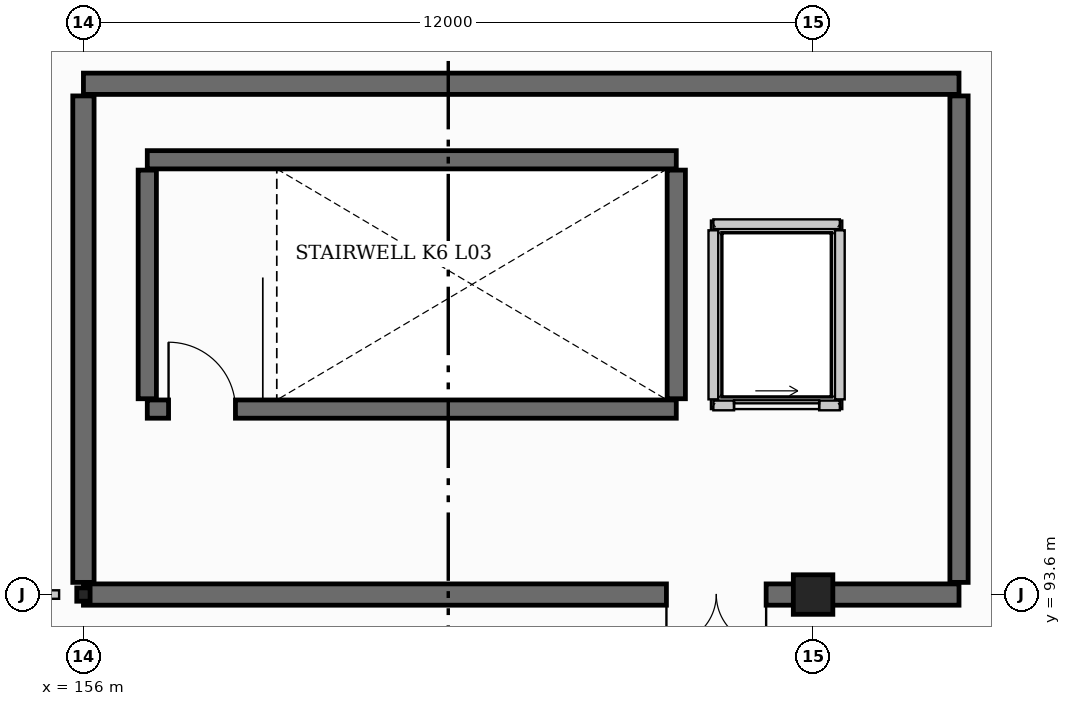
"""IFC4 building model, lengths in metres.
Left out: names, types, materials, properties, quantities, classifications, styles, units other than length and angle.
Written with IfcOpenShell. Run it as: python <this file> out.ifc"""

import sys

from ifc_helpers import new_model, si_unit, direction, frame, frame_2d, origin, origin_2d, place, context, subcontext, project, spatial, rectangle, hollow_circle, extrude, element, fill, save


model = new_model("IFC4")
c1 = context("Model", 3, precision=1e-05, world=origin(), true_north=direction((0.0, 1.0)))
c2 = subcontext(c1, "Body", "Model", "MODEL_VIEW")
j1 = project(units=[si_unit("LENGTHUNIT", "METRE"), si_unit("PLANEANGLEUNIT", "RADIAN")], contexts=[c1])
p1 = place(None, origin())
s1 = spatial("IfcSite", under=j1, at=p1, CompositionType="ELEMENT")
p2 = place(p1, origin())
s2 = spatial("IfcBuilding", under=s1, at=p2, CompositionType="ELEMENT")
p3 = place(p2, frame((0.0, 0.0, 14.4)))
s3 = spatial("IfcBuildingStorey", under=s2, at=p3, CompositionType="ELEMENT", Elevation=14.4)
p4 = place(p3, frame((156.0, 93.6, 0.0), z_axis=(0.0, 0.0, 1.0), x_axis=(0.0, 1.0, 0.0)))
e1 = element("IfcColumn", 1, at=p4, inside=s3, PredefinedType="COLUMN", context=c2, shape_type="SweptSolid", body=[
    extrude(hollow_circle(Radius=0.11, WallThickness=0.01, at=origin_2d()), origin(), (0.0, 0.0, 1.0), 3.9),
])
p5 = place(p3, frame((168.0, 93.6, 0.0), z_axis=(0.0, 0.0, 1.0), x_axis=(1.0, 0.0, 0.0)))
e2 = element("IfcColumn", 2, at=p5, inside=s3, PredefinedType="COLUMN", context=c2, shape_type="SweptSolid", body=[
    extrude(rectangle(XDim=0.65, YDim=0.65, at=origin_2d()), origin(), (0.0, 0.0, 1.0), 3.9),
])
p6 = place(p3, frame((156.0, 102.0, 0.0), z_axis=(0.0, 0.0, 1.0), x_axis=(1.0, 0.0, 0.0)))
e3 = element("IfcWall", 3, at=p6, inside=s3, PredefinedType="SHEAR", context=c2, shape_type="SweptSolid", body=[
    extrude(rectangle(XDim=14.4, YDim=0.35, at=frame_2d((7.2, 0.0))), origin(), (0.0, 0.0, 1.0), 3.9),
])
p7 = place(p3, frame((170.4, 93.6, 0.0), z_axis=(0.0, 0.0, 1.0), x_axis=(-1.0, 0.0, 0.0)))
e4 = element("IfcWall", 4, at=p7, inside=s3, PredefinedType="SHEAR", context=c2, shape_type="SweptSolid", body=[
    extrude(rectangle(XDim=14.4, YDim=0.35, at=frame_2d((7.2, 0.0))), origin(), (0.0, 0.0, 1.0), 3.9),
])
p8 = place(p7, frame((3.172, 0.0, 0.0)))
e5 = element("IfcOpeningElement", 5, at=p8, cuts=e4, PredefinedType="OPENING", context=c2, shape_type="SweptSolid", body=[
    extrude(rectangle(XDim=1.64, YDim=2.2, at=frame_2d((0.82, 1.1))), frame((0.0, 0.185, 0.0), z_axis=(0.0, -1.0, 0.0), x_axis=(1.0, 0.0, 0.0)), (0.0, 0.0, 1.0), 0.37),
])
p9 = place(p3, frame((156.0, 93.8, 0.0), z_axis=(0.0, 0.0, 1.0), x_axis=(0.0, 1.0, 0.0)))
e6 = element("IfcWall", 6, at=p9, inside=s3, PredefinedType="SHEAR", context=c2, shape_type="SweptSolid", body=[
    extrude(rectangle(XDim=8.0, YDim=0.35, at=frame_2d((4.0, 0.0))), origin(), (0.0, 0.0, 1.0), 3.9),
])
p10 = place(p3, frame((170.4, 101.8, 0.0), z_axis=(0.0, 0.0, 1.0), x_axis=(0.0, -1.0, 0.0)))
e7 = element("IfcWall", 7, at=p10, inside=s3, PredefinedType="SHEAR", context=c2, shape_type="SweptSolid", body=[
    extrude(rectangle(XDim=8.0, YDim=0.3, at=frame_2d((4.0, 0.0))), origin(), (0.0, 0.0, 1.0), 3.9),
])
p11 = place(p3, frame((157.05, 96.65, 0.0), z_axis=(0.0, 0.0, 1.0), x_axis=(1.0, 0.0, 0.0)))
e8 = element("IfcWall", 8, at=p11, inside=s3, PredefinedType="SHEAR", context=c2, shape_type="SweptSolid", body=[
    extrude(rectangle(XDim=8.7, YDim=0.3, at=frame_2d((4.35, 0.0))), origin(), (0.0, 0.0, 1.0), 3.9),
])
p12 = place(p11, frame((0.35, 0.0, 0.0)))
e9 = element("IfcOpeningElement", 9, at=p12, cuts=e8, PredefinedType="OPENING", context=c2, shape_type="SweptSolid", body=[
    extrude(rectangle(XDim=1.1, YDim=2.15, at=frame_2d((0.55, 1.075))), frame((0.0, 0.16, 0.0), z_axis=(0.0, -1.0, 0.0), x_axis=(1.0, 0.0, 0.0)), (0.0, 0.0, 1.0), 0.32),
])
p13 = place(p3, frame((165.75, 100.75, 0.0), z_axis=(0.0, 0.0, 1.0), x_axis=(-1.0, 0.0, 0.0)))
e10 = element("IfcWall", 10, at=p13, inside=s3, PredefinedType="SHEAR", context=c2, shape_type="SweptSolid", body=[
    extrude(rectangle(XDim=8.7, YDim=0.3, at=frame_2d((4.35, 0.0))), origin(), (0.0, 0.0, 1.0), 3.9),
])
for number, where, z_axis, x_axis in (
    (11, (157.05, 96.82, 0.0), (0.0, 0.0, 1.0), (0.0, 1.0, 0.0)),
    (12, (165.75, 96.82, 0.0), (0.0, 0.0, 1.0), (0.0, 1.0, 0.0)),
):
    element("IfcWall", number, at=place(p3, frame(where, z_axis=z_axis, x_axis=x_axis)), inside=s3, PredefinedType="SHEAR", context=c2, shape_type="SweptSolid", body=[
        extrude(rectangle(XDim=3.76, YDim=0.3, at=frame_2d((1.88, 0.0))), origin(), (0.0, 0.0, 1.0), 3.9),
    ])
p14 = place(p3, frame((166.36, 96.71, 0.0), z_axis=(0.0, 0.0, 1.0), x_axis=(1.0, 0.0, 0.0)))
e13 = element("IfcWall", 13, at=p14, inside=s3, PredefinedType="PARTITIONING", context=c2, shape_type="SweptSolid", body=[
    extrude(rectangle(XDim=2.08, YDim=0.16, at=frame_2d((1.04, 0.0))), origin(), (0.0, 0.0, 1.0), 3.56),
])
p15 = place(p14, frame((0.34, 0.0, 0.0)))
e14 = element("IfcOpeningElement", 14, at=p15, cuts=e13, PredefinedType="OPENING", context=c2, shape_type="SweptSolid", body=[
    extrude(rectangle(XDim=1.4, YDim=2.2, at=frame_2d((0.7, 1.1))), frame((0.0, 0.09, 0.0), z_axis=(0.0, -1.0, 0.0), x_axis=(1.0, 0.0, 0.0)), (0.0, 0.0, 1.0), 0.18),
])
p16 = place(p3, frame((168.44, 99.69, 0.0), z_axis=(0.0, 0.0, 1.0), x_axis=(-1.0, 0.0, 0.0)))
e15 = element("IfcWall", 15, at=p16, inside=s3, PredefinedType="PARTITIONING", context=c2, shape_type="SweptSolid", body=[
    extrude(rectangle(XDim=2.08, YDim=0.16, at=frame_2d((1.04, 0.0))), origin(), (0.0, 0.0, 1.0), 3.56),
])
for number, where, z_axis, x_axis in (
    (16, (166.36, 99.59, 0.0), (0.0, 0.0, 1.0), (0.0, -1.0, 0.0)),
    (17, (168.44, 96.81, 0.0), (0.0, 0.0, 1.0), (0.0, 1.0, 0.0)),
):
    element("IfcWall", number, at=place(p3, frame(where, z_axis=z_axis, x_axis=x_axis)), inside=s3, PredefinedType="PARTITIONING", context=c2, shape_type="SweptSolid", body=[
        extrude(rectangle(XDim=2.78, YDim=0.16, at=frame_2d((1.39, 0.0))), origin(), (0.0, 0.0, 1.0), 3.56),
    ])
p17 = place(p3, frame((144.3, 93.6, 0.0), z_axis=(0.0, 0.0, 1.0), x_axis=(1.0, 0.0, 0.0)))
e18 = element("IfcWall", 18, at=p17, inside=s3, PredefinedType="PARTITIONING", context=c2, shape_type="SweptSolid", body=[
    extrude(rectangle(XDim=11.3, YDim=0.14, at=frame_2d((5.65, 0.0))), origin(), (0.0, 0.0, 1.0), 3.142),
])
p18 = place(p17, frame((5.0, 0.0, 0.0)))
e19 = element("IfcOpeningElement", 19, at=p18, cuts=e18, PredefinedType="OPENING", context=c2, shape_type="SweptSolid", body=[
    extrude(rectangle(XDim=0.96, YDim=2.06, at=frame_2d((0.48, 1.03))), frame((0.0, 0.08, 0.0), z_axis=(0.0, -1.0, 0.0), x_axis=(1.0, 0.0, 0.0)), (0.0, 0.0, 1.0), 0.16),
])
p19 = place(p15, origin())
e20 = element("IfcDoor", 20, at=p19, inside=s3, OperationType="SLIDING_TO_RIGHT", PredefinedType="DOOR", context=c2, shape_type="SweptSolid", body=[
    extrude(rectangle(XDim=1.4, YDim=2.2, at=frame_2d((0.7, 1.1))), frame((0.0, 0.025, 0.0), z_axis=(0.0, -1.0, 0.0), x_axis=(1.0, 0.0, 0.0)), (0.0, 0.0, 1.0), 0.05),
])
fill(e14, e20)
p20 = place(p12, origin())
e21 = element("IfcDoor", 21, at=p20, inside=s3, OperationType="SINGLE_SWING_LEFT", PredefinedType="DOOR", context=c2, shape_type="SweptSolid", body=[
    extrude(rectangle(XDim=1.1, YDim=2.15, at=frame_2d((0.55, 1.075))), frame((0.0, 0.025, 0.0), z_axis=(0.0, -1.0, 0.0), x_axis=(1.0, 0.0, 0.0)), (0.0, 0.0, 1.0), 0.05),
])
fill(e9, e21)
p21 = place(p8, origin())
e22 = element("IfcDoor", 22, at=p21, inside=s3, OperationType="DOUBLE_DOOR_SINGLE_SWING", PredefinedType="DOOR", context=c2, shape_type="SweptSolid", body=[
    extrude(rectangle(XDim=1.64, YDim=2.2, at=frame_2d((0.82, 1.1))), frame((0.0, 0.025, 0.0), z_axis=(0.0, -1.0, 0.0), x_axis=(1.0, 0.0, 0.0)), (0.0, 0.0, 1.0), 0.05),
])
fill(e5, e22)
save(model, sys.argv[1])
